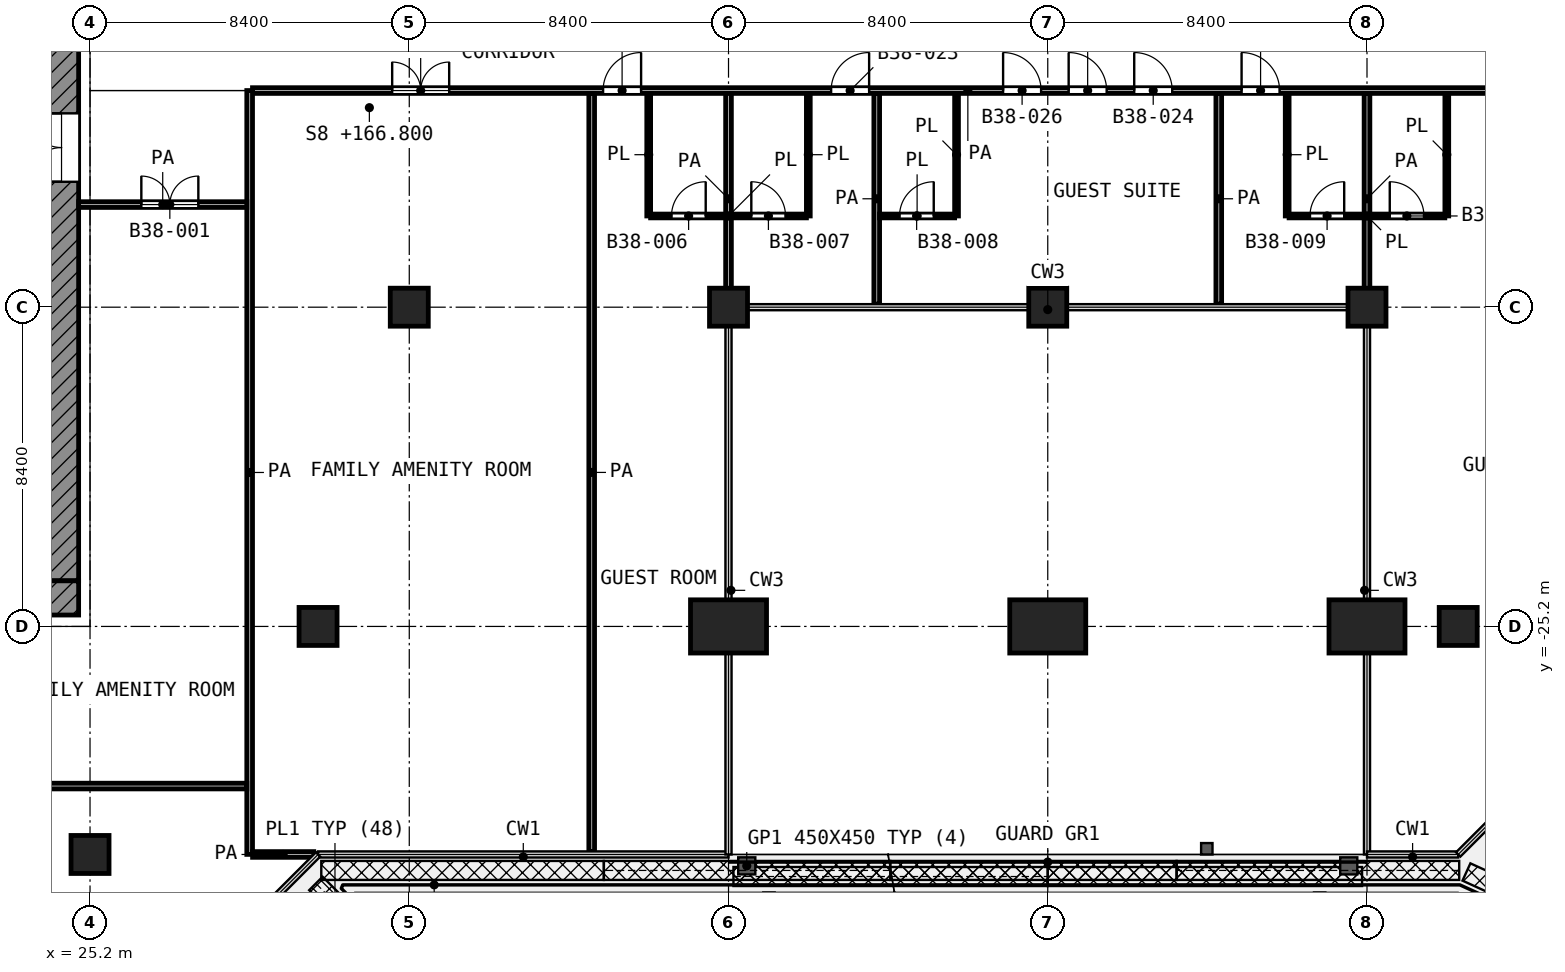
"""IFC4 building model, lengths in metres.
Left out: names, types, materials, properties, quantities, classifications, styles, units other than length and angle.
Written with IfcOpenShell. Run it as: python <this file> out.ifc"""

import sys

from ifc_helpers import new_model, si_unit, direction, frame, frame_2d, origin, origin_2d, place, context, subcontext, project, spatial, rectangle, extrude, element, fill, save


model = new_model("IFC4")
c1 = context("Model", 3, precision=1e-05, world=origin(), true_north=direction((0.0, 1.0)))
c2 = subcontext(c1, "Body", "Model", "MODEL_VIEW")
j1 = project(units=[si_unit("LENGTHUNIT", "METRE"), si_unit("PLANEANGLEUNIT", "RADIAN")], contexts=[c1])
p1 = place(None, origin())
s1 = spatial("IfcSite", under=j1, at=p1, CompositionType="ELEMENT")
p2 = place(p1, origin())
s2 = spatial("IfcBuilding", under=s1, at=p2, CompositionType="ELEMENT")
p3 = place(p2, frame((0.0, 0.0, 166.8)))
s3 = spatial("IfcBuildingStorey", under=s2, at=p3, CompositionType="ELEMENT", Elevation=166.8)
for number, where, z_axis, x_axis in (
    (1, (33.6, -16.8, 0.0), (0.0, 0.0, 1.0), (1.0, 0.0, 0.0)),
    (2, (42.0, -16.8, 0.0), (0.0, 0.0, 1.0), (1.0, 0.0, 0.0)),
    (3, (50.4, -16.8, 0.0), (0.0, 0.0, 1.0), (1.0, 0.0, 0.0)),
    (4, (58.8, -16.8, 0.0), (0.0, 0.0, 1.0), (1.0, 0.0, 0.0)),
    (5, (31.2, -25.2, 0.0), (0.0, 0.0, 1.0), (1.0, 0.0, 0.0)),
):
    element("IfcColumn", number, at=place(p3, frame(where, z_axis=z_axis, x_axis=x_axis)), inside=s3, PredefinedType="COLUMN", context=c2, shape_type="SweptSolid", body=[
        extrude(rectangle(XDim=1.0, YDim=1.0, at=origin_2d()), origin(), (0.0, 0.0, 1.0), 4.2),
    ])
for number, where, z_axis, x_axis in (
    (6, (42.0, -25.2, 0.0), (0.0, 0.0, 1.0), (-1.0, 0.0, 0.0)),
    (7, (50.4, -25.2, 0.0), (0.0, 0.0, 1.0), (-1.0, 0.0, 0.0)),
):
    element("IfcColumn", number, at=place(p3, frame(where, z_axis=z_axis, x_axis=x_axis)), inside=s3, PredefinedType="COLUMN", context=c2, shape_type="SweptSolid", body=[
        extrude(rectangle(XDim=2.0, YDim=1.4, at=origin_2d()), origin(), (0.0, 0.0, 1.0), 4.2),
    ])
for number, where, z_axis, x_axis in (
    (8, (61.2, -25.2, 0.0), (0.0, 0.0, 1.0), (1.0, 0.0, 0.0)),
    (9, (25.2, -31.2, 0.0), (0.0, 0.0, 1.0), (1.0, 0.0, 0.0)),
):
    element("IfcColumn", number, at=place(p3, frame(where, z_axis=z_axis, x_axis=x_axis)), inside=s3, PredefinedType="COLUMN", context=c2, shape_type="SweptSolid", body=[
        extrude(rectangle(XDim=1.0, YDim=1.0, at=origin_2d()), origin(), (0.0, 0.0, 1.0), 4.2),
    ])
p4 = place(p3, frame((58.8, -25.2, 0.0), z_axis=(0.0, 0.0, 1.0), x_axis=(-1.0, 0.0, 0.0)))
e10 = element("IfcColumn", 10, at=p4, inside=s3, PredefinedType="COLUMN", context=c2, shape_type="SweptSolid", body=[
    extrude(rectangle(XDim=2.0, YDim=1.4, at=origin_2d()), origin(), (0.0, 0.0, 1.0), 4.2),
])
p5 = place(p3, frame((24.45, -24.0, 0.0), z_axis=(0.0, 0.0, 1.0), x_axis=(0.0, 1.0, 0.0)))
e11 = element("IfcWall", 11, at=p5, inside=s3, PredefinedType="SHEAR", context=c2, shape_type="SweptSolid", body=[
    extrude(rectangle(XDim=18.6, YDim=0.9, at=frame_2d((9.3, 0.0))), origin(), (0.0, 0.0, 1.0), 3.6),
])
p6 = place(p5, frame((10.5, 0.0, 0.0)))
e12 = element("IfcOpeningElement", 12, at=p6, cuts=e11, PredefinedType="OPENING", context=c2, shape_type="SweptSolid", body=[
    extrude(rectangle(XDim=1.8, YDim=2.1, at=frame_2d((0.9, 1.05))), frame((0.0, 0.46, 0.0), z_axis=(0.0, -1.0, 0.0), x_axis=(1.0, 0.0, 0.0)), (0.0, 0.0, 1.0), 0.92),
])
p7 = place(p3, frame((24.45, -24.9, 0.0), z_axis=(0.0, 0.0, 1.0), x_axis=(0.0, 1.0, 0.0)))
e13 = element("IfcWall", 13, at=p7, inside=s3, PredefinedType="SHEAR", context=c2, shape_type="SweptSolid", body=[
    extrude(rectangle(XDim=0.9, YDim=0.9, at=frame_2d((0.45, 0.0))), origin(), (0.0, 0.0, 1.0), 3.6),
])
p8 = place(p3, frame((39.95, -14.4, 0.0), z_axis=(0.0, 0.0, 1.0), x_axis=(1.0, 0.0, 0.0)))
e14 = element("IfcWall", 14, at=p8, inside=s3, PredefinedType="PARTITIONING", context=c2, shape_type="SweptSolid", body=[
    extrude(rectangle(XDim=4.1, YDim=0.1, at=frame_2d((2.05, 0.0))), origin(), (0.0, 0.0, 1.0), 3.6),
])
p9 = place(p8, frame((0.55, 0.0, 0.0)))
e15 = element("IfcOpeningElement", 15, at=p9, cuts=e14, PredefinedType="OPENING", context=c2, shape_type="SweptSolid", body=[
    extrude(rectangle(XDim=0.9, YDim=2.1, at=frame_2d((0.45, 1.05))), frame((0.0, 0.06, 0.0), z_axis=(0.0, -1.0, 0.0), x_axis=(1.0, 0.0, 0.0)), (0.0, 0.0, 1.0), 0.12),
])
p10 = place(p8, frame((2.65, 0.0, 0.0)))
e16 = element("IfcOpeningElement", 16, at=p10, cuts=e14, PredefinedType="OPENING", context=c2, shape_type="SweptSolid", body=[
    extrude(rectangle(XDim=0.9, YDim=2.1, at=frame_2d((0.45, 1.05))), frame((0.0, 0.06, 0.0), z_axis=(0.0, -1.0, 0.0), x_axis=(1.0, 0.0, 0.0)), (0.0, 0.0, 1.0), 0.12),
])
p11 = place(p3, frame((45.975, -14.4, 0.0), z_axis=(0.0, 0.0, 1.0), x_axis=(1.0, 0.0, 0.0)))
e17 = element("IfcWall", 17, at=p11, inside=s3, PredefinedType="PARTITIONING", context=c2, shape_type="SweptSolid", body=[
    extrude(rectangle(XDim=1.975, YDim=0.1, at=frame_2d((0.987, 0.0))), origin(), (0.0, 0.0, 1.0), 3.6),
])
p12 = place(p11, frame((0.525, 0.0, 0.0)))
e18 = element("IfcOpeningElement", 18, at=p12, cuts=e17, PredefinedType="OPENING", context=c2, shape_type="SweptSolid", body=[
    extrude(rectangle(XDim=0.9, YDim=2.1, at=frame_2d((0.45, 1.05))), frame((0.0, 0.06, 0.0), z_axis=(0.0, -1.0, 0.0), x_axis=(1.0, 0.0, 0.0)), (0.0, 0.0, 1.0), 0.12),
])
p13 = place(p3, frame((56.75, -14.4, 0.0), z_axis=(0.0, 0.0, 1.0), x_axis=(1.0, 0.0, 0.0)))
e19 = element("IfcWall", 19, at=p13, inside=s3, PredefinedType="PARTITIONING", context=c2, shape_type="SweptSolid", body=[
    extrude(rectangle(XDim=4.098, YDim=0.1, at=frame_2d((2.049, 0.0))), origin(), (0.0, 0.0, 1.0), 3.6),
])
p14 = place(p13, frame((0.55, 0.0, 0.0)))
e20 = element("IfcOpeningElement", 20, at=p14, cuts=e19, PredefinedType="OPENING", context=c2, shape_type="SweptSolid", body=[
    extrude(rectangle(XDim=0.9, YDim=2.1, at=frame_2d((0.45, 1.05))), frame((0.0, 0.06, 0.0), z_axis=(0.0, -1.0, 0.0), x_axis=(1.0, 0.0, 0.0)), (0.0, 0.0, 1.0), 0.12),
])
p15 = place(p13, frame((2.649, 0.0, 0.0)))
e21 = element("IfcOpeningElement", 21, at=p15, cuts=e19, PredefinedType="OPENING", context=c2, shape_type="SweptSolid", body=[
    extrude(rectangle(XDim=0.9, YDim=2.1, at=frame_2d((0.45, 1.05))), frame((0.0, 0.06, 0.0), z_axis=(0.0, -1.0, 0.0), x_axis=(1.0, 0.0, 0.0)), (0.0, 0.0, 1.0), 0.12),
])
for number, where, z_axis, x_axis in (
    (22, (39.9, -14.4, 0.0), (0.0, 0.0, 1.0), (0.0, 1.0, 0.0)),
    (23, (44.1, -14.4, 0.0), (0.0, 0.0, 1.0), (0.0, 1.0, 0.0)),
    (24, (48.0, -14.4, 0.0), (0.0, 0.0, 1.0), (0.0, 1.0, 0.0)),
    (25, (56.7, -14.4, 0.0), (0.0, 0.0, 1.0), (0.0, 1.0, 0.0)),
):
    element("IfcWall", number, at=place(p3, frame(where, z_axis=z_axis, x_axis=x_axis)), inside=s3, PredefinedType="PARTITIONING", context=c2, shape_type="SweptSolid", body=[
        extrude(rectangle(XDim=3.225, YDim=0.1, at=frame_2d((1.612, 0.0))), origin(), (0.0, 0.0, 1.0), 3.6),
    ])
p16 = place(p3, frame((60.9, -14.399, 0.0), z_axis=(0.0, 0.0, 1.0), x_axis=(0.0, 1.0, 0.0)))
e26 = element("IfcWall", 26, at=p16, inside=s3, PredefinedType="PARTITIONING", context=c2, shape_type="SweptSolid", body=[
    extrude(rectangle(XDim=3.224, YDim=0.1, at=frame_2d((1.612, 0.0))), origin(), (0.0, 0.0, 1.0), 3.6),
])
p17 = place(p3, frame((29.477, -31.2, 0.0), z_axis=(0.0, 0.0, 1.0), x_axis=(1.0, 0.0, 0.0)))
e27 = element("IfcWall", 27, at=p17, inside=s3, PredefinedType="PARTITIONING", context=c2, shape_type="SweptSolid", body=[
    extrude(rectangle(XDim=1.61, YDim=0.15, at=frame_2d((0.805, 0.0))), origin(), (0.0, 0.0, 1.0), 3.6),
])
p18 = place(p3, frame((11.175, -29.4, 0.0), z_axis=(0.0, 0.0, 1.0), x_axis=(1.0, 0.0, 0.0)))
e28 = element("IfcWall", 28, at=p18, inside=s3, PredefinedType="PARTITIONING", context=c2, shape_type="SweptSolid", body=[
    extrude(rectangle(XDim=18.15, YDim=0.15, at=frame_2d((9.075, 0.0))), origin(), (0.0, 0.0, 1.0), 3.6),
])
p19 = place(p3, frame((24.9, -14.1, 0.0), z_axis=(0.0, 0.0, 1.0), x_axis=(1.0, 0.0, 0.0)))
e29 = element("IfcWall", 29, at=p19, inside=s3, PredefinedType="PARTITIONING", context=c2, shape_type="SweptSolid", body=[
    extrude(rectangle(XDim=4.425, YDim=0.15, at=frame_2d((2.212, 0.0))), origin(), (0.0, 0.0, 1.0), 3.6),
])
p20 = place(p19, frame((1.65, 0.0, 0.0)))
e30 = element("IfcOpeningElement", 30, at=p20, cuts=e29, PredefinedType="OPENING", context=c2, shape_type="SweptSolid", body=[
    extrude(rectangle(XDim=1.5, YDim=2.1, at=frame_2d((0.75, 1.05))), frame((0.0, 0.085, 0.0), z_axis=(0.0, -1.0, 0.0), x_axis=(1.0, 0.0, 0.0)), (0.0, 0.0, 1.0), 0.17),
])
p21 = place(p3, frame((29.475, -11.1, 0.0), z_axis=(0.0, 0.0, 1.0), x_axis=(1.0, 0.0, 0.0)))
e31 = element("IfcWall", 31, at=p21, inside=s3, PredefinedType="PARTITIONING", context=c2, shape_type="SweptSolid", body=[
    extrude(rectangle(XDim=37.645, YDim=0.15, at=frame_2d((18.823, 0.0))), origin(), (0.0, 0.0, 1.0), 3.6),
])
p22 = place(p21, frame((3.675, 0.0, 0.0)))
e32 = element("IfcOpeningElement", 32, at=p22, cuts=e31, PredefinedType="OPENING", context=c2, shape_type="SweptSolid", body=[
    extrude(rectangle(XDim=1.5, YDim=2.1, at=frame_2d((0.75, 1.05))), frame((0.0, 0.085, 0.0), z_axis=(0.0, -1.0, 0.0), x_axis=(1.0, 0.0, 0.0)), (0.0, 0.0, 1.0), 0.17),
])
p23 = place(p21, frame((9.225, 0.0, 0.0)))
e33 = element("IfcOpeningElement", 33, at=p23, cuts=e31, PredefinedType="OPENING", context=c2, shape_type="SweptSolid", body=[
    extrude(rectangle(XDim=1.0, YDim=2.1, at=frame_2d((0.5, 1.05))), frame((0.0, 0.085, 0.0), z_axis=(0.0, -1.0, 0.0), x_axis=(1.0, 0.0, 0.0)), (0.0, 0.0, 1.0), 0.17),
])
p24 = place(p21, frame((15.225, 0.0, 0.0)))
e34 = element("IfcOpeningElement", 34, at=p24, cuts=e31, PredefinedType="OPENING", context=c2, shape_type="SweptSolid", body=[
    extrude(rectangle(XDim=1.0, YDim=2.1, at=frame_2d((0.5, 1.05))), frame((0.0, 0.085, 0.0), z_axis=(0.0, -1.0, 0.0), x_axis=(1.0, 0.0, 0.0)), (0.0, 0.0, 1.0), 0.17),
])
p25 = place(p21, frame((23.2, 0.0, 0.0)))
e35 = element("IfcOpeningElement", 35, at=p25, cuts=e31, PredefinedType="OPENING", context=c2, shape_type="SweptSolid", body=[
    extrude(rectangle(XDim=1.0, YDim=2.1, at=frame_2d((0.5, 1.05))), frame((0.0, 0.085, 0.0), z_axis=(0.0, -1.0, 0.0), x_axis=(1.0, 0.0, 0.0)), (0.0, 0.0, 1.0), 0.17),
])
p26 = place(p21, frame((21.475, 0.0, 0.0)))
e36 = element("IfcOpeningElement", 36, at=p26, cuts=e31, PredefinedType="OPENING", context=c2, shape_type="SweptSolid", body=[
    extrude(rectangle(XDim=1.0, YDim=2.1, at=frame_2d((0.5, 1.05))), frame((0.0, 0.085, 0.0), z_axis=(0.0, -1.0, 0.0), x_axis=(1.0, 0.0, 0.0)), (0.0, 0.0, 1.0), 0.17),
])
p27 = place(p21, frame((19.75, 0.0, 0.0)))
e37 = element("IfcOpeningElement", 37, at=p27, cuts=e31, PredefinedType="OPENING", context=c2, shape_type="SweptSolid", body=[
    extrude(rectangle(XDim=1.0, YDim=2.1, at=frame_2d((0.5, 1.05))), frame((0.0, 0.085, 0.0), z_axis=(0.0, -1.0, 0.0), x_axis=(1.0, 0.0, 0.0)), (0.0, 0.0, 1.0), 0.17),
])
p28 = place(p21, frame((26.025, 0.0, 0.0)))
e38 = element("IfcOpeningElement", 38, at=p28, cuts=e31, PredefinedType="OPENING", context=c2, shape_type="SweptSolid", body=[
    extrude(rectangle(XDim=1.0, YDim=2.1, at=frame_2d((0.5, 1.05))), frame((0.0, 0.085, 0.0), z_axis=(0.0, -1.0, 0.0), x_axis=(1.0, 0.0, 0.0)), (0.0, 0.0, 1.0), 0.17),
])
p29 = place(p21, frame((35.125, 0.0, 0.0)))
e39 = element("IfcOpeningElement", 39, at=p29, cuts=e31, PredefinedType="OPENING", context=c2, shape_type="SweptSolid", body=[
    extrude(rectangle(XDim=1.0, YDim=2.1, at=frame_2d((0.5, 1.05))), frame((0.0, 0.085, 0.0), z_axis=(0.0, -1.0, 0.0), x_axis=(1.0, 0.0, 0.0)), (0.0, 0.0, 1.0), 0.17),
])
p30 = place(p21, frame((33.025, 0.0, 0.0)))
e40 = element("IfcOpeningElement", 40, at=p30, cuts=e31, PredefinedType="OPENING", context=c2, shape_type="SweptSolid", body=[
    extrude(rectangle(XDim=1.0, YDim=2.1, at=frame_2d((0.5, 1.05))), frame((0.0, 0.085, 0.0), z_axis=(0.0, -1.0, 0.0), x_axis=(1.0, 0.0, 0.0)), (0.0, 0.0, 1.0), 0.17),
])
p31 = place(p3, frame((29.4, -31.198, 0.0), z_axis=(0.0, 0.0, 1.0), x_axis=(0.0, 1.0, 0.0)))
e41 = element("IfcWall", 41, at=p31, inside=s3, PredefinedType="PARTITIONING", context=c2, shape_type="SweptSolid", body=[
    extrude(rectangle(XDim=20.098, YDim=0.15, at=frame_2d((10.049, 0.0))), origin(), (0.0, 0.0, 1.0), 3.6),
])
p32 = place(p3, frame((38.4, -31.12, 0.0), z_axis=(0.0, 0.0, 1.0), x_axis=(0.0, 1.0, 0.0)))
e42 = element("IfcWall", 42, at=p32, inside=s3, PredefinedType="PARTITIONING", context=c2, shape_type="SweptSolid", body=[
    extrude(rectangle(XDim=19.945, YDim=0.15, at=frame_2d((9.973, 0.0))), origin(), (0.0, 0.0, 1.0), 3.6),
])
for number, where, z_axis, x_axis in (
    (43, (42.0, -16.72, 0.0), (0.0, 0.0, 1.0), (0.0, 1.0, 0.0)),
    (44, (45.9, -16.72, 0.0), (0.0, 0.0, 1.0), (0.0, 1.0, 0.0)),
    (45, (54.9, -16.72, 0.0), (0.0, 0.0, 1.0), (0.0, 1.0, 0.0)),
    (46, (58.8, -16.72, 0.0), (0.0, 0.0, 1.0), (0.0, 1.0, 0.0)),
):
    element("IfcWall", number, at=place(p3, frame(where, z_axis=z_axis, x_axis=x_axis)), inside=s3, PredefinedType="PARTITIONING", context=c2, shape_type="SweptSolid", body=[
        extrude(rectangle(XDim=5.545, YDim=0.15, at=frame_2d((2.772, 0.0))), origin(), (0.0, 0.0, 1.0), 3.6),
    ])
p33 = place(p6, origin())
e47 = element("IfcDoor", 47, at=p33, inside=s3, OperationType="DOUBLE_DOOR_SINGLE_SWING", PredefinedType="DOOR", context=c2, shape_type="SweptSolid", body=[
    extrude(rectangle(XDim=1.8, YDim=2.1, at=frame_2d((0.9, 1.05))), frame((0.0, 0.025, 0.0), z_axis=(0.0, -1.0, 0.0), x_axis=(1.0, 0.0, 0.0)), (0.0, 0.0, 1.0), 0.05),
])
fill(e12, e47)
p34 = place(p20, origin())
e48 = element("IfcDoor", 48, at=p34, inside=s3, OperationType="DOUBLE_DOOR_SINGLE_SWING", PredefinedType="DOOR", context=c2, shape_type="SweptSolid", body=[
    extrude(rectangle(XDim=1.5, YDim=2.1, at=frame_2d((0.75, 1.05))), frame((0.0, 0.025, 0.0), z_axis=(0.0, -1.0, 0.0), x_axis=(1.0, 0.0, 0.0)), (0.0, 0.0, 1.0), 0.05),
])
fill(e30, e48)
p35 = place(p22, origin())
e49 = element("IfcDoor", 49, at=p35, inside=s3, OperationType="DOUBLE_DOOR_SINGLE_SWING", PredefinedType="DOOR", context=c2, shape_type="SweptSolid", body=[
    extrude(rectangle(XDim=1.5, YDim=2.1, at=frame_2d((0.75, 1.05))), frame((0.0, 0.025, 0.0), z_axis=(0.0, -1.0, 0.0), x_axis=(1.0, 0.0, 0.0)), (0.0, 0.0, 1.0), 0.05),
])
fill(e32, e49)
p36 = place(p23, origin())
e50 = element("IfcDoor", 50, at=p36, inside=s3, OperationType="SINGLE_SWING_RIGHT", PredefinedType="DOOR", context=c2, shape_type="SweptSolid", body=[
    extrude(rectangle(XDim=1.0, YDim=2.1, at=frame_2d((0.5, 1.05))), frame((0.0, 0.025, 0.0), z_axis=(0.0, -1.0, 0.0), x_axis=(1.0, 0.0, 0.0)), (0.0, 0.0, 1.0), 0.05),
])
fill(e33, e50)
p37 = place(p9, origin())
e51 = element("IfcDoor", 51, at=p37, inside=s3, OperationType="SINGLE_SWING_RIGHT", PredefinedType="DOOR", context=c2, shape_type="SweptSolid", body=[
    extrude(rectangle(XDim=0.9, YDim=2.1, at=frame_2d((0.45, 1.05))), frame((0.0, 0.025, 0.0), z_axis=(0.0, -1.0, 0.0), x_axis=(1.0, 0.0, 0.0)), (0.0, 0.0, 1.0), 0.05),
])
fill(e15, e51)
p38 = place(p24, origin())
e52 = element("IfcDoor", 52, at=p38, inside=s3, OperationType="SINGLE_SWING_RIGHT", PredefinedType="DOOR", context=c2, shape_type="SweptSolid", body=[
    extrude(rectangle(XDim=1.0, YDim=2.1, at=frame_2d((0.5, 1.05))), frame((0.0, 0.025, 0.0), z_axis=(0.0, -1.0, 0.0), x_axis=(1.0, 0.0, 0.0)), (0.0, 0.0, 1.0), 0.05),
])
fill(e34, e52)
p39 = place(p10, origin())
e53 = element("IfcDoor", 53, at=p39, inside=s3, OperationType="SINGLE_SWING_LEFT", PredefinedType="DOOR", context=c2, shape_type="SweptSolid", body=[
    extrude(rectangle(XDim=0.9, YDim=2.1, at=frame_2d((0.45, 1.05))), frame((0.0, 0.025, 0.0), z_axis=(0.0, -1.0, 0.0), x_axis=(1.0, 0.0, 0.0)), (0.0, 0.0, 1.0), 0.05),
])
fill(e16, e53)
p40 = place(p25, origin())
e54 = element("IfcDoor", 54, at=p40, inside=s3, OperationType="SINGLE_SWING_LEFT", PredefinedType="DOOR", context=c2, shape_type="SweptSolid", body=[
    extrude(rectangle(XDim=1.0, YDim=2.1, at=frame_2d((0.5, 1.05))), frame((0.0, 0.025, 0.0), z_axis=(0.0, -1.0, 0.0), x_axis=(1.0, 0.0, 0.0)), (0.0, 0.0, 1.0), 0.05),
])
fill(e35, e54)
p41 = place(p26, origin())
e55 = element("IfcDoor", 55, at=p41, inside=s3, OperationType="SINGLE_SWING_LEFT", PredefinedType="DOOR", context=c2, shape_type="SweptSolid", body=[
    extrude(rectangle(XDim=1.0, YDim=2.1, at=frame_2d((0.5, 1.05))), frame((0.0, 0.025, 0.0), z_axis=(0.0, -1.0, 0.0), x_axis=(1.0, 0.0, 0.0)), (0.0, 0.0, 1.0), 0.05),
])
fill(e36, e55)
p42 = place(p27, origin())
e56 = element("IfcDoor", 56, at=p42, inside=s3, OperationType="SINGLE_SWING_LEFT", PredefinedType="DOOR", context=c2, shape_type="SweptSolid", body=[
    extrude(rectangle(XDim=1.0, YDim=2.1, at=frame_2d((0.5, 1.05))), frame((0.0, 0.025, 0.0), z_axis=(0.0, -1.0, 0.0), x_axis=(1.0, 0.0, 0.0)), (0.0, 0.0, 1.0), 0.05),
])
fill(e37, e56)
p43 = place(p12, origin())
e57 = element("IfcDoor", 57, at=p43, inside=s3, OperationType="SINGLE_SWING_RIGHT", PredefinedType="DOOR", context=c2, shape_type="SweptSolid", body=[
    extrude(rectangle(XDim=0.9, YDim=2.1, at=frame_2d((0.45, 1.05))), frame((0.0, 0.025, 0.0), z_axis=(0.0, -1.0, 0.0), x_axis=(1.0, 0.0, 0.0)), (0.0, 0.0, 1.0), 0.05),
])
fill(e18, e57)
p44 = place(p28, origin())
e58 = element("IfcDoor", 58, at=p44, inside=s3, OperationType="SINGLE_SWING_LEFT", PredefinedType="DOOR", context=c2, shape_type="SweptSolid", body=[
    extrude(rectangle(XDim=1.0, YDim=2.1, at=frame_2d((0.5, 1.05))), frame((0.0, 0.025, 0.0), z_axis=(0.0, -1.0, 0.0), x_axis=(1.0, 0.0, 0.0)), (0.0, 0.0, 1.0), 0.05),
])
fill(e38, e58)
p45 = place(p14, origin())
e59 = element("IfcDoor", 59, at=p45, inside=s3, OperationType="SINGLE_SWING_RIGHT", PredefinedType="DOOR", context=c2, shape_type="SweptSolid", body=[
    extrude(rectangle(XDim=0.9, YDim=2.1, at=frame_2d((0.45, 1.05))), frame((0.0, 0.025, 0.0), z_axis=(0.0, -1.0, 0.0), x_axis=(1.0, 0.0, 0.0)), (0.0, 0.0, 1.0), 0.05),
])
fill(e20, e59)
p46 = place(p15, origin())
e60 = element("IfcDoor", 60, at=p46, inside=s3, OperationType="SINGLE_SWING_LEFT", PredefinedType="DOOR", context=c2, shape_type="SweptSolid", body=[
    extrude(rectangle(XDim=0.9, YDim=2.1, at=frame_2d((0.45, 1.05))), frame((0.0, 0.025, 0.0), z_axis=(0.0, -1.0, 0.0), x_axis=(1.0, 0.0, 0.0)), (0.0, 0.0, 1.0), 0.05),
])
fill(e21, e60)
save(model, sys.argv[1])
